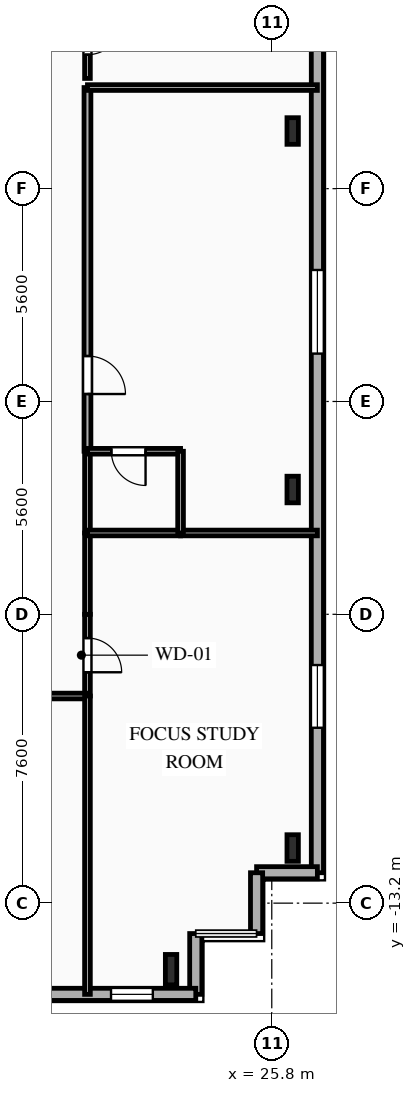
"""IFC4 building model, lengths in metres.
Left out: names, types, materials, properties, quantities, classifications, styles, units other than length and angle.
Written with IfcOpenShell. Run it as: python <this file> out.ifc"""

import sys

from ifc_helpers import new_model, si_unit, direction, frame, frame_2d, origin, origin_2d, place, context, subcontext, project, spatial, rectangle, i_section, extrude, element, fill, save


model = new_model("IFC4")
c1 = context("Model", 3, precision=1e-05, world=origin(), true_north=direction((0.0, 1.0)))
c2 = subcontext(c1, "Body", "Model", "MODEL_VIEW")
j1 = project(units=[si_unit("LENGTHUNIT", "METRE"), si_unit("PLANEANGLEUNIT", "RADIAN")], contexts=[c1])
p1 = place(None, origin())
s1 = spatial("IfcSite", under=j1, at=p1, CompositionType="ELEMENT")
p2 = place(p1, origin())
s2 = spatial("IfcBuilding", under=s1, at=p2, CompositionType="ELEMENT")
p3 = place(p2, frame((0.0, 0.0, 154.45)))
s3 = spatial("IfcBuildingStorey", under=s2, at=p3, CompositionType="ELEMENT", Elevation=154.45)
p4 = place(p3, frame((23.15, -14.95, 0.0), z_axis=(0.0, 0.0, 1.0), x_axis=(1.0, 0.0, 0.0)))
e1 = element("IfcColumn", 1, at=p4, inside=s3, PredefinedType="COLUMN", context=c2, shape_type="SweptSolid", body=[
    extrude(i_section(OverallWidth=0.3, OverallDepth=0.8, WebThickness=0.018, FlangeThickness=0.033, FilletRadius=0.03, at=origin_2d()), origin(), (0.0, 0.0, 1.0), 3.35),
])
for number, where, z_axis, x_axis in (
    (2, (26.35, -11.75, 0.0), (0.0, 0.0, 1.0), (1.0, 0.0, 0.0)),
    (3, (26.35, -2.317, 0.0), (0.0, 0.0, 1.0), (1.0, 0.0, 0.0)),
    (4, (26.35, 7.117, 0.0), (0.0, 0.0, 1.0), (1.0, 0.0, 0.0)),
):
    element("IfcColumn", number, at=place(p3, frame(where, z_axis=z_axis, x_axis=x_axis)), inside=s3, PredefinedType="COLUMN", context=c2, shape_type="SweptSolid", body=[
        extrude(i_section(OverallWidth=0.3, OverallDepth=0.7, WebThickness=0.017, FlangeThickness=0.032, FilletRadius=0.027, at=origin_2d()), origin(), (0.0, 0.0, 1.0), 3.35),
    ])
p5 = place(p3, frame((27.0, 17.2, 0.0), z_axis=(0.0, 0.0, 1.0), x_axis=(0.0, -1.0, 0.0)))
e5 = element("IfcWall", 5, at=p5, inside=s3, PredefinedType="SOLIDWALL", context=c2, shape_type="SweptSolid", body=[
    extrude(rectangle(XDim=29.6, YDim=0.32, at=frame_2d((14.8, 0.0))), origin(), (0.0, 0.0, 1.0), 3.04),
])
p6 = place(p5, frame((3.895, 0.0, 0.85)))
e6 = element("IfcOpeningElement", 6, at=p6, cuts=e5, PredefinedType="OPENING", context=c2, shape_type="SweptSolid", body=[
    extrude(rectangle(XDim=1.65, YDim=1.85, at=frame_2d((0.825, 0.925))), frame((0.0, 0.17, 0.0), z_axis=(0.0, -1.0, 0.0), x_axis=(1.0, 0.0, 0.0)), (0.0, 0.0, 1.0), 0.34),
])
p7 = place(p5, frame((13.74, 0.0, 0.85)))
e7 = element("IfcOpeningElement", 7, at=p7, cuts=e5, PredefinedType="OPENING", context=c2, shape_type="SweptSolid", body=[
    extrude(rectangle(XDim=2.2, YDim=1.85, at=frame_2d((1.1, 0.925))), frame((0.0, 0.17, 0.0), z_axis=(0.0, -1.0, 0.0), x_axis=(1.0, 0.0, 0.0)), (0.0, 0.0, 1.0), 0.34),
])
p8 = place(p5, frame((24.135, 0.0, 0.85)))
e8 = element("IfcOpeningElement", 8, at=p8, cuts=e5, PredefinedType="OPENING", context=c2, shape_type="SweptSolid", body=[
    extrude(rectangle(XDim=1.65, YDim=1.85, at=frame_2d((0.825, 0.925))), frame((0.0, 0.17, 0.0), z_axis=(0.0, -1.0, 0.0), x_axis=(1.0, 0.0, 0.0)), (0.0, 0.0, 1.0), 0.34),
])
for number, where, z_axis, x_axis in (
    (9, (27.0, -12.4, 0.0), (0.0, 0.0, 1.0), (-1.0, 0.0, 0.0)),
    (10, (25.4, -12.4, 0.0), (0.0, 0.0, 1.0), (0.0, -1.0, 0.0)),
    (11, (23.8, -14.0, 0.0), (0.0, 0.0, 1.0), (0.0, -1.0, 0.0)),
):
    element("IfcWall", number, at=place(p3, frame(where, z_axis=z_axis, x_axis=x_axis)), inside=s3, PredefinedType="SOLIDWALL", context=c2, shape_type="SweptSolid", body=[
        extrude(rectangle(XDim=1.6, YDim=0.32, at=frame_2d((0.8, 0.0))), origin(), (0.0, 0.0, 1.0), 3.04),
    ])
p9 = place(p3, frame((23.8, -15.6, 0.0), z_axis=(0.0, 0.0, 1.0), x_axis=(-1.0, 0.0, 0.0)))
e12 = element("IfcWall", 12, at=p9, inside=s3, PredefinedType="SOLIDWALL", context=c2, shape_type="SweptSolid", body=[
    extrude(rectangle(XDim=49.6, YDim=0.32, at=frame_2d((24.8, 0.0))), origin(), (0.0, 0.0, 1.0), 3.04),
])
p10 = place(p9, frame((1.13, 0.0, 0.85)))
e13 = element("IfcOpeningElement", 13, at=p10, cuts=e12, PredefinedType="OPENING", context=c2, shape_type="SweptSolid", body=[
    extrude(rectangle(XDim=1.1, YDim=1.85, at=frame_2d((0.55, 0.925))), frame((0.0, 0.17, 0.0), z_axis=(0.0, -1.0, 0.0), x_axis=(1.0, 0.0, 0.0)), (0.0, 0.0, 1.0), 0.34),
])
p11 = place(p9, frame((5.055, 0.0, 0.85)))
e14 = element("IfcOpeningElement", 14, at=p11, cuts=e12, PredefinedType="OPENING", context=c2, shape_type="SweptSolid", body=[
    extrude(rectangle(XDim=1.65, YDim=1.85, at=frame_2d((0.825, 0.925))), frame((0.0, 0.17, 0.0), z_axis=(0.0, -1.0, 0.0), x_axis=(1.0, 0.0, 0.0)), (0.0, 0.0, 1.0), 0.34),
])
p12 = place(p9, frame((10.78, 0.0, 0.85)))
e15 = element("IfcOpeningElement", 15, at=p12, cuts=e12, PredefinedType="OPENING", context=c2, shape_type="SweptSolid", body=[
    extrude(rectangle(XDim=2.2, YDim=1.85, at=frame_2d((1.1, 0.925))), frame((0.0, 0.17, 0.0), z_axis=(0.0, -1.0, 0.0), x_axis=(1.0, 0.0, 0.0)), (0.0, 0.0, 1.0), 0.34),
])
p13 = place(p9, frame((17.284, 0.0, 0.85)))
e16 = element("IfcOpeningElement", 16, at=p13, cuts=e12, PredefinedType="OPENING", context=c2, shape_type="SweptSolid", body=[
    extrude(rectangle(XDim=2.2, YDim=1.85, at=frame_2d((1.1, 0.925))), frame((0.0, 0.17, 0.0), z_axis=(0.0, -1.0, 0.0), x_axis=(1.0, 0.0, 0.0)), (0.0, 0.0, 1.0), 0.34),
])
p14 = place(p9, frame((22.248, 0.0, 0.85)))
e17 = element("IfcOpeningElement", 17, at=p14, cuts=e12, PredefinedType="OPENING", context=c2, shape_type="SweptSolid", body=[
    extrude(rectangle(XDim=2.2, YDim=1.85, at=frame_2d((1.1, 0.925))), frame((0.0, 0.17, 0.0), z_axis=(0.0, -1.0, 0.0), x_axis=(1.0, 0.0, 0.0)), (0.0, 0.0, 1.0), 0.34),
])
p15 = place(p9, frame((28.7, 0.0, 0.85)))
e18 = element("IfcOpeningElement", 18, at=p15, cuts=e12, PredefinedType="OPENING", context=c2, shape_type="SweptSolid", body=[
    extrude(rectangle(XDim=2.2, YDim=1.85, at=frame_2d((1.1, 0.925))), frame((0.0, 0.17, 0.0), z_axis=(0.0, -1.0, 0.0), x_axis=(1.0, 0.0, 0.0)), (0.0, 0.0, 1.0), 0.34),
])
p16 = place(p9, frame((34.7, 0.0, 0.85)))
e19 = element("IfcOpeningElement", 19, at=p16, cuts=e12, PredefinedType="OPENING", context=c2, shape_type="SweptSolid", body=[
    extrude(rectangle(XDim=2.2, YDim=1.85, at=frame_2d((1.1, 0.925))), frame((0.0, 0.17, 0.0), z_axis=(0.0, -1.0, 0.0), x_axis=(1.0, 0.0, 0.0)), (0.0, 0.0, 1.0), 0.34),
])
p17 = place(p9, frame((41.492, 0.0, 0.85)))
e20 = element("IfcOpeningElement", 20, at=p17, cuts=e12, PredefinedType="OPENING", context=c2, shape_type="SweptSolid", body=[
    extrude(rectangle(XDim=1.65, YDim=1.85, at=frame_2d((0.825, 0.925))), frame((0.0, 0.17, 0.0), z_axis=(0.0, -1.0, 0.0), x_axis=(1.0, 0.0, 0.0)), (0.0, 0.0, 1.0), 0.34),
])
p18 = place(p9, frame((46.175, 0.0, 0.85)))
e21 = element("IfcOpeningElement", 21, at=p18, cuts=e12, PredefinedType="OPENING", context=c2, shape_type="SweptSolid", body=[
    extrude(rectangle(XDim=1.65, YDim=1.85, at=frame_2d((0.825, 0.925))), frame((0.0, 0.17, 0.0), z_axis=(0.0, -1.0, 0.0), x_axis=(1.0, 0.0, 0.0)), (0.0, 0.0, 1.0), 0.34),
])
p19 = place(p3, frame((20.95, 10.65, 0.0), z_axis=(0.0, 0.0, 1.0), x_axis=(0.0, -1.0, 0.0)))
e22 = element("IfcWall", 22, at=p19, inside=s3, PredefinedType="PARTITIONING", context=c2, shape_type="SweptSolid", body=[
    extrude(rectangle(XDim=2.15, YDim=0.15, at=frame_2d((1.075, 0.0))), origin(), (0.0, 0.0, 1.0), 3.04),
])
p20 = place(p19, frame((0.625, 0.0, 0.0)))
e23 = element("IfcOpeningElement", 23, at=p20, cuts=e22, PredefinedType="OPENING", context=c2, shape_type="SweptSolid", body=[
    extrude(rectangle(XDim=0.9, YDim=2.1, at=frame_2d((0.45, 1.05))), frame((0.0, 0.085, 0.0), z_axis=(0.0, -1.0, 0.0), x_axis=(1.0, 0.0, 0.0)), (0.0, 0.0, 1.0), 0.17),
])
p21 = place(p3, frame((20.95, -5.6, 0.0), z_axis=(0.0, 0.0, 1.0), x_axis=(0.0, -1.0, 0.0)))
e24 = element("IfcWall", 24, at=p21, inside=s3, PredefinedType="PARTITIONING", context=c2, shape_type="SweptSolid", body=[
    extrude(rectangle(XDim=2.15, YDim=0.15, at=frame_2d((1.075, 0.0))), origin(), (0.0, 0.0, 1.0), 3.04),
])
p22 = place(p21, frame((0.625, 0.0, 0.0)))
e25 = element("IfcOpeningElement", 25, at=p22, cuts=e24, PredefinedType="OPENING", context=c2, shape_type="SweptSolid", body=[
    extrude(rectangle(XDim=0.9, YDim=2.1, at=frame_2d((0.45, 1.05))), frame((0.0, 0.085, 0.0), z_axis=(0.0, -1.0, 0.0), x_axis=(1.0, 0.0, 0.0)), (0.0, 0.0, 1.0), 0.17),
])
p23 = place(p3, frame((20.95, -7.75, 0.0), z_axis=(0.0, 0.0, 1.0), x_axis=(-1.0, 0.0, 0.0)))
e26 = element("IfcWall", 26, at=p23, inside=s3, PredefinedType="PARTITIONING", context=c2, shape_type="SweptSolid", body=[
    extrude(rectangle(XDim=5.986, YDim=0.15, at=frame_2d((2.993, 0.0))), origin(), (0.0, 0.0, 1.0), 3.04),
])
p24 = place(p23, frame((3.884, 0.0, 0.0)))
e27 = element("IfcOpeningElement", 27, at=p24, cuts=e26, PredefinedType="OPENING", context=c2, shape_type="SweptSolid", body=[
    extrude(rectangle(XDim=1.05, YDim=2.15, at=frame_2d((0.525, 1.075))), frame((0.0, 0.085, 0.0), z_axis=(0.0, -1.0, 0.0), x_axis=(1.0, 0.0, 0.0)), (0.0, 0.0, 1.0), 0.17),
])
p25 = place(p3, frame((20.95, -3.46, 0.0), z_axis=(0.0, 0.0, 1.0), x_axis=(0.0, -1.0, 0.0)))
e28 = element("IfcWall", 28, at=p25, inside=s3, PredefinedType="PARTITIONING", context=c2, shape_type="SweptSolid", body=[
    extrude(rectangle(XDim=2.14, YDim=0.15, at=frame_2d((1.07, 0.0))), origin(), (0.0, 0.0, 1.0), 3.04),
])
p26 = place(p3, frame((20.95, 8.26, 0.0), z_axis=(0.0, 0.0, 1.0), x_axis=(0.0, -1.0, 0.0)))
e29 = element("IfcWall", 29, at=p26, inside=s3, PredefinedType="PARTITIONING", context=c2, shape_type="SweptSolid", body=[
    extrude(rectangle(XDim=9.57, YDim=0.18, at=frame_2d((4.785, 0.0))), origin(), (0.0, 0.0, 1.0), 3.04),
])
p27 = place(p26, frame((7.064, 0.0, 0.0)))
e30 = element("IfcOpeningElement", 30, at=p27, cuts=e29, PredefinedType="OPENING", context=c2, shape_type="SweptSolid", body=[
    extrude(rectangle(XDim=1.0, YDim=2.15, at=frame_2d((0.5, 1.075))), frame((0.0, 0.1, 0.0), z_axis=(0.0, -1.0, 0.0), x_axis=(1.0, 0.0, 0.0)), (0.0, 0.0, 1.0), 0.2),
])
p28 = place(p3, frame((20.95, -1.31, 0.0), z_axis=(0.0, 0.0, 1.0), x_axis=(0.0, -1.0, 0.0)))
e31 = element("IfcWall", 31, at=p28, inside=s3, PredefinedType="PLUMBINGWALL", context=c2, shape_type="SweptSolid", body=[
    extrude(rectangle(XDim=2.15, YDim=0.15, at=frame_2d((1.075, 0.0))), origin(), (0.0, 0.0, 1.0), 3.04),
])
p29 = place(p3, frame((23.4, -3.46, 0.0), z_axis=(0.0, 0.0, 1.0), x_axis=(1.0, 0.0, 0.0)))
e32 = element("IfcWall", 32, at=p29, inside=s3, PredefinedType="PARTITIONING", context=c2, shape_type="SweptSolid", body=[
    extrude(rectangle(XDim=3.6, YDim=0.15, at=frame_2d((1.8, 0.0))), origin(), (0.0, 0.0, 1.0), 3.04),
])
p30 = place(p3, frame((20.95, -3.46, 0.0), z_axis=(0.0, 0.0, 1.0), x_axis=(1.0, 0.0, 0.0)))
e33 = element("IfcWall", 33, at=p30, inside=s3, PredefinedType="PLUMBINGWALL", context=c2, shape_type="SweptSolid", body=[
    extrude(rectangle(XDim=2.45, YDim=0.15, at=frame_2d((1.225, 0.0))), origin(), (0.0, 0.0, 1.0), 3.04),
])
p31 = place(p3, frame((20.95, -15.6, 0.0), z_axis=(0.0, 0.0, 1.0), x_axis=(0.0, 1.0, 0.0)))
e34 = element("IfcWall", 34, at=p31, inside=s3, PredefinedType="PARTITIONING", context=c2, shape_type="SweptSolid", body=[
    extrude(rectangle(XDim=7.85, YDim=0.15, at=frame_2d((3.925, 0.0))), origin(), (0.0, 0.0, 1.0), 3.04),
])
p32 = place(p3, frame((23.4, -1.31, 0.0), z_axis=(0.0, 0.0, 1.0), x_axis=(-1.0, 0.0, 0.0)))
e35 = element("IfcWall", 35, at=p32, inside=s3, PredefinedType="PLUMBINGWALL", context=c2, shape_type="SweptSolid", body=[
    extrude(rectangle(XDim=2.45, YDim=0.15, at=frame_2d((1.225, 0.0))), origin(), (0.0, 0.0, 1.0), 3.04),
])
p33 = place(p32, frame((0.921, 0.0, 0.0)))
e36 = element("IfcOpeningElement", 36, at=p33, cuts=e35, PredefinedType="OPENING", context=c2, shape_type="SweptSolid", body=[
    extrude(rectangle(XDim=0.9, YDim=2.1, at=frame_2d((0.45, 1.05))), frame((0.0, 0.085, 0.0), z_axis=(0.0, -1.0, 0.0), x_axis=(1.0, 0.0, 0.0)), (0.0, 0.0, 1.0), 0.17),
])
p34 = place(p3, frame((23.4, -3.46, 0.0), z_axis=(0.0, 0.0, 1.0), x_axis=(0.0, 1.0, 0.0)))
e37 = element("IfcWall", 37, at=p34, inside=s3, PredefinedType="PLUMBINGWALL", context=c2, shape_type="SweptSolid", body=[
    extrude(rectangle(XDim=2.15, YDim=0.15, at=frame_2d((1.075, 0.0))), origin(), (0.0, 0.0, 1.0), 3.04),
])
p35 = place(p3, frame((20.95, 8.26, 0.0), z_axis=(0.0, 0.0, 1.0), x_axis=(1.0, 0.0, 0.0)))
e38 = element("IfcWall", 38, at=p35, inside=s3, PredefinedType="PARTITIONING", context=c2, shape_type="SweptSolid", body=[
    extrude(rectangle(XDim=6.05, YDim=0.15, at=frame_2d((3.025, 0.0))), origin(), (0.0, 0.0, 1.0), 3.04),
])
p36 = place(p7, origin())
e39 = element("IfcWindow", 39, at=p36, inside=s3, PartitioningType="SINGLE_PANEL", PredefinedType="WINDOW", context=c2, shape_type="SweptSolid", body=[
    extrude(rectangle(XDim=2.2, YDim=1.85, at=frame_2d((1.1, 0.925))), frame((0.0, 0.03, 0.0), z_axis=(0.0, -1.0, 0.0), x_axis=(1.0, 0.0, 0.0)), (0.0, 0.0, 1.0), 0.06),
])
fill(e7, e39)
p37 = place(p8, origin())
e40 = element("IfcWindow", 40, at=p37, inside=s3, PartitioningType="SINGLE_PANEL", PredefinedType="WINDOW", context=c2, shape_type="SweptSolid", body=[
    extrude(rectangle(XDim=1.65, YDim=1.85, at=frame_2d((0.825, 0.925))), frame((0.0, 0.03, 0.0), z_axis=(0.0, -1.0, 0.0), x_axis=(1.0, 0.0, 0.0)), (0.0, 0.0, 1.0), 0.06),
])
fill(e8, e40)
p38 = place(p10, origin())
e41 = element("IfcWindow", 41, at=p38, inside=s3, PartitioningType="SINGLE_PANEL", PredefinedType="WINDOW", context=c2, shape_type="SweptSolid", body=[
    extrude(rectangle(XDim=1.1, YDim=1.85, at=frame_2d((0.55, 0.925))), frame((0.0, 0.03, 0.0), z_axis=(0.0, -1.0, 0.0), x_axis=(1.0, 0.0, 0.0)), (0.0, 0.0, 1.0), 0.06),
])
fill(e13, e41)
p39 = place(p20, origin())
e42 = element("IfcDoor", 42, at=p39, inside=s3, OperationType="SINGLE_SWING_LEFT", PredefinedType="DOOR", context=c2, shape_type="SweptSolid", body=[
    extrude(rectangle(XDim=0.9, YDim=2.1, at=frame_2d((0.45, 1.05))), frame((0.0, 0.025, 0.0), z_axis=(0.0, -1.0, 0.0), x_axis=(1.0, 0.0, 0.0)), (0.0, 0.0, 1.0), 0.05),
])
fill(e23, e42)
p40 = place(p22, origin())
e43 = element("IfcDoor", 43, at=p40, inside=s3, OperationType="SINGLE_SWING_RIGHT", PredefinedType="DOOR", context=c2, shape_type="SweptSolid", body=[
    extrude(rectangle(XDim=0.9, YDim=2.1, at=frame_2d((0.45, 1.05))), frame((0.0, 0.025, 0.0), z_axis=(0.0, -1.0, 0.0), x_axis=(1.0, 0.0, 0.0)), (0.0, 0.0, 1.0), 0.05),
])
fill(e25, e43)
p41 = place(p27, origin())
e44 = element("IfcDoor", 44, at=p41, inside=s3, OperationType="SINGLE_SWING_RIGHT", PredefinedType="DOOR", context=c2, shape_type="SweptSolid", body=[
    extrude(rectangle(XDim=1.0, YDim=2.15, at=frame_2d((0.5, 1.075))), frame((0.0, 0.025, 0.0), z_axis=(0.0, -1.0, 0.0), x_axis=(1.0, 0.0, 0.0)), (0.0, 0.0, 1.0), 0.05),
])
fill(e30, e44)
p42 = place(p33, origin())
e45 = element("IfcDoor", 45, at=p42, inside=s3, OperationType="SINGLE_SWING_LEFT", PredefinedType="DOOR", context=c2, shape_type="SweptSolid", body=[
    extrude(rectangle(XDim=0.9, YDim=2.1, at=frame_2d((0.45, 1.05))), frame((0.0, 0.025, 0.0), z_axis=(0.0, -1.0, 0.0), x_axis=(1.0, 0.0, 0.0)), (0.0, 0.0, 1.0), 0.05),
])
fill(e36, e45)
save(model, sys.argv[1])
